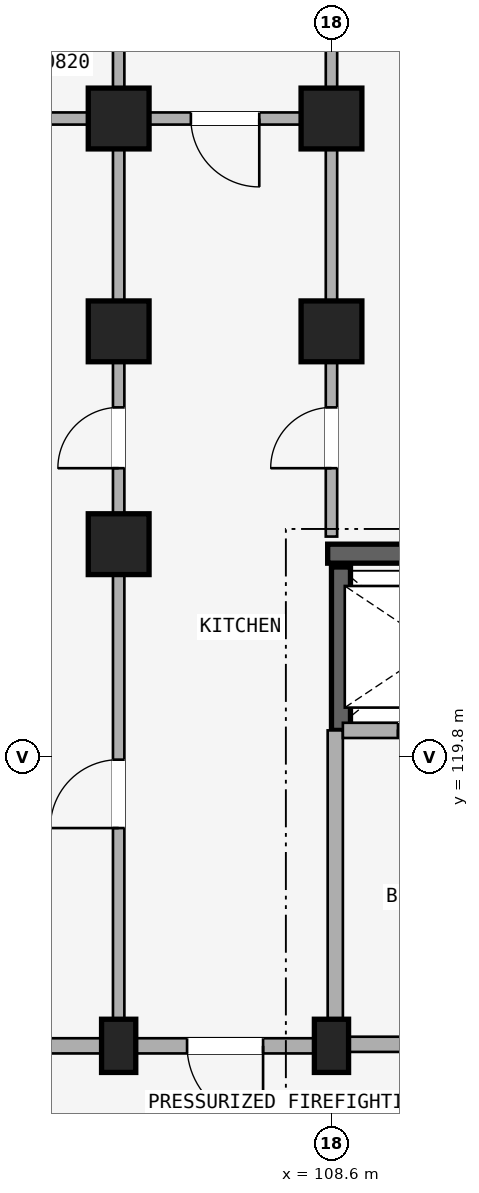
"""IFC4 building model, lengths in metres.
Left out: names, types, materials, properties, quantities, classifications, styles, units other than length and angle.
Written with IfcOpenShell. Run it as: python <this file> out.ifc"""

import sys

from ifc_helpers import new_model, si_unit, direction, frame, frame_2d, origin, origin_2d, place, context, subcontext, project, spatial, rectangle, extrude, element, fill, save


model = new_model("IFC4")
c1 = context("Model", 3, precision=1e-05, world=origin(), true_north=direction((0.0, 1.0)))
c2 = subcontext(c1, "Body", "Model", "MODEL_VIEW")
j1 = project(units=[si_unit("LENGTHUNIT", "METRE"), si_unit("PLANEANGLEUNIT", "RADIAN")], contexts=[c1])
p1 = place(None, origin())
s1 = spatial("IfcSite", under=j1, at=p1, CompositionType="ELEMENT")
p2 = place(p1, origin())
s2 = spatial("IfcBuilding", under=s1, at=p2, CompositionType="ELEMENT")
p3 = place(p2, frame((0.0, 0.0, 11.85)))
s3 = spatial("IfcBuildingStorey", under=s2, at=p3, CompositionType="ELEMENT", Elevation=11.85)
p4 = place(p3, frame((111.35, 122.475, 0.0), z_axis=(0.0, 0.0, 1.0), x_axis=(-1.0, 0.0, 0.0)))
e1 = element("IfcWall", 1, at=p4, inside=s3, PredefinedType="SHEAR", context=c2, shape_type="SweptSolid", body=[
    extrude(rectangle(XDim=2.8, YDim=0.25, at=frame_2d((1.4, 0.0))), origin(), (0.0, 0.0, 1.0), 2.93),
])
p5 = place(p3, frame((108.725, 120.15, 0.0), z_axis=(0.0, 0.0, 1.0), x_axis=(0.0, 1.0, 0.0)))
e2 = element("IfcWall", 2, at=p5, inside=s3, PredefinedType="SHEAR", context=c2, shape_type="SweptSolid", body=[
    extrude(rectangle(XDim=2.15, YDim=0.25, at=frame_2d((1.075, 0.0))), origin(), (0.0, 0.0, 1.0), 2.93),
])
p6 = place(p3, frame((108.6, 116.0, 0.0), z_axis=(0.0, 0.0, 1.0), x_axis=(1.0, 0.0, 0.0)))
e3 = element("IfcColumn", 3, at=p6, inside=s3, PredefinedType="COLUMN", context=c2, shape_type="SweptSolid", body=[
    extrude(rectangle(XDim=0.45, YDim=0.7, at=origin_2d()), origin(), (0.0, 0.0, 1.0), 2.93),
])
for number, where, z_axis, x_axis in (
    (4, (108.6, 125.4, 0.0), (0.0, 0.0, 1.0), (1.0, 0.0, 0.0)),
    (5, (108.6, 128.2, 0.0), (0.0, 0.0, 1.0), (1.0, 0.0, 0.0)),
):
    element("IfcColumn", number, at=place(p3, frame(where, z_axis=z_axis, x_axis=x_axis)), inside=s3, PredefinedType="COLUMN", context=c2, shape_type="SweptSolid", body=[
        extrude(rectangle(XDim=0.8, YDim=0.8, at=origin_2d()), origin(), (0.0, 0.0, 1.0), 2.93),
    ])
p7 = place(p3, frame((105.8, 116.0, 0.0), z_axis=(0.0, 0.0, 1.0), x_axis=(1.0, 0.0, 0.0)))
e6 = element("IfcColumn", 6, at=p7, inside=s3, PredefinedType="COLUMN", context=c2, shape_type="SweptSolid", body=[
    extrude(rectangle(XDim=0.45, YDim=0.7, at=origin_2d()), origin(), (0.0, 0.0, 1.0), 2.93),
])
for number, where, z_axis, x_axis in (
    (7, (105.8, 122.6, 0.0), (0.0, 0.0, 1.0), (1.0, 0.0, 0.0)),
    (8, (105.8, 125.4, 0.0), (0.0, 0.0, 1.0), (1.0, 0.0, 0.0)),
    (9, (105.8, 128.2, 0.0), (0.0, 0.0, 1.0), (1.0, 0.0, 0.0)),
):
    element("IfcColumn", number, at=place(p3, frame(where, z_axis=z_axis, x_axis=x_axis)), inside=s3, PredefinedType="COLUMN", context=c2, shape_type="SweptSolid", body=[
        extrude(rectangle(XDim=0.8, YDim=0.8, at=origin_2d()), origin(), (0.0, 0.0, 1.0), 2.93),
    ])
p8 = place(p3, frame((114.3, 116.02, 0.0), z_axis=(0.0, 0.0, 1.0), x_axis=(-1.0, 0.0, 0.0)))
e10 = element("IfcWall", 10, at=p8, inside=s3, PredefinedType="STANDARD", context=c2, shape_type="SweptSolid", body=[
    extrude(rectangle(XDim=5.65, YDim=0.2, at=frame_2d((2.825, 0.0))), origin(), (0.0, 0.0, 1.0), 2.372),
])
p9 = place(p8, frame((1.923, 0.0, 0.0)))
e11 = element("IfcOpeningElement", 11, at=p9, cuts=e10, PredefinedType="OPENING", context=c2, shape_type="SweptSolid", body=[
    extrude(rectangle(XDim=1.24, YDim=2.15, at=frame_2d((0.62, 1.075))), frame((0.0, 0.11, 0.0), z_axis=(0.0, -1.0, 0.0), x_axis=(1.0, 0.0, 0.0)), (0.0, 0.0, 1.0), 0.22),
])
p10 = place(p3, frame((108.65, 116.02, 0.0), z_axis=(0.0, 0.0, 1.0), x_axis=(0.0, 1.0, 0.0)))
e12 = element("IfcWall", 12, at=p10, inside=s3, PredefinedType="STANDARD", context=c2, shape_type="SweptSolid", body=[
    extrude(rectangle(XDim=4.13, YDim=0.2, at=frame_2d((2.065, 0.0))), origin(), (0.0, 0.0, 1.0), 2.372),
])
p11 = place(p3, frame((111.3, 120.15, 0.0), z_axis=(0.0, 0.0, 1.0), x_axis=(-1.0, 0.0, 0.0)))
e13 = element("IfcWall", 13, at=p11, inside=s3, PredefinedType="STANDARD", context=c2, shape_type="SweptSolid", body=[
    extrude(rectangle(XDim=2.55, YDim=0.2, at=frame_2d((1.275, 0.0))), origin(), (0.0, 0.0, 1.0), 2.372),
])
p12 = place(p11, frame((0.725, 0.0, 0.0)))
e14 = element("IfcOpeningElement", 14, at=p12, cuts=e13, PredefinedType="OPENING", context=c2, shape_type="SweptSolid", body=[
    extrude(rectangle(XDim=1.1, YDim=2.15, at=frame_2d((0.55, 1.075))), frame((0.0, 0.11, 0.0), z_axis=(0.0, -1.0, 0.0), x_axis=(1.0, 0.0, 0.0)), (0.0, 0.0, 1.0), 0.22),
])
p13 = place(p3, frame((108.6, 116.0, 0.0), z_axis=(0.0, 0.0, 1.0), x_axis=(-1.0, 0.0, 0.0)))
e15 = element("IfcWall", 15, at=p13, inside=s3, PredefinedType="STANDARD", context=c2, shape_type="SweptSolid", body=[
    extrude(rectangle(XDim=2.8, YDim=0.2, at=frame_2d((1.4, 0.0))), origin(), (0.0, 0.0, 1.0), 2.372),
])
p14 = place(p13, frame((0.9, 0.0, 0.0)))
e16 = element("IfcOpeningElement", 16, at=p14, cuts=e15, PredefinedType="OPENING", context=c2, shape_type="SweptSolid", body=[
    extrude(rectangle(XDim=1.0, YDim=2.15, at=frame_2d((0.5, 1.075))), frame((0.0, 0.11, 0.0), z_axis=(0.0, -1.0, 0.0), x_axis=(1.0, 0.0, 0.0)), (0.0, 0.0, 1.0), 0.22),
])
p15 = place(p3, frame((108.52, 128.2, 0.0), z_axis=(0.0, 0.0, 1.0), x_axis=(-1.0, 0.0, 0.0)))
e17 = element("IfcWall", 17, at=p15, inside=s3, PredefinedType="PLUMBINGWALL", context=c2, shape_type="SweptSolid", body=[
    extrude(rectangle(XDim=2.64, YDim=0.16, at=frame_2d((1.32, 0.0))), origin(), (0.0, 0.0, 1.0), 2.372),
])
p16 = place(p15, frame((0.87, 0.0, 0.0)))
e18 = element("IfcOpeningElement", 18, at=p16, cuts=e17, PredefinedType="OPENING", context=c2, shape_type="SweptSolid", body=[
    extrude(rectangle(XDim=0.9, YDim=2.1, at=frame_2d((0.45, 1.05))), frame((0.0, 0.09, 0.0), z_axis=(0.0, -1.0, 0.0), x_axis=(1.0, 0.0, 0.0)), (0.0, 0.0, 1.0), 0.18),
])
p17 = place(p3, frame((105.8, 116.0, 0.0), z_axis=(0.0, 0.0, 1.0), x_axis=(-1.0, 0.0, 0.0)))
e19 = element("IfcWall", 19, at=p17, inside=s3, PredefinedType="STANDARD", context=c2, shape_type="SweptSolid", body=[
    extrude(rectangle(XDim=2.8, YDim=0.2, at=frame_2d((1.4, 0.0))), origin(), (0.0, 0.0, 1.0), 2.372),
])
p18 = place(p3, frame((105.72, 128.2, 0.0), z_axis=(0.0, 0.0, 1.0), x_axis=(-1.0, 0.0, 0.0)))
e20 = element("IfcWall", 20, at=p18, inside=s3, PredefinedType="PLUMBINGWALL", context=c2, shape_type="SweptSolid", body=[
    extrude(rectangle(XDim=2.64, YDim=0.16, at=frame_2d((1.32, 0.0))), origin(), (0.0, 0.0, 1.0), 2.372),
])
p19 = place(p18, frame((0.92, 0.0, 0.0)))
e21 = element("IfcOpeningElement", 21, at=p19, cuts=e20, PredefinedType="OPENING", context=c2, shape_type="SweptSolid", body=[
    extrude(rectangle(XDim=0.8, YDim=2.1, at=frame_2d((0.4, 1.05))), frame((0.0, 0.09, 0.0), z_axis=(0.0, -1.0, 0.0), x_axis=(1.0, 0.0, 0.0)), (0.0, 0.0, 1.0), 0.18),
])
p20 = place(p3, frame((108.6, 122.7, 0.0), z_axis=(0.0, 0.0, 1.0), x_axis=(0.0, 1.0, 0.0)))
e22 = element("IfcWall", 22, at=p20, inside=s3, PredefinedType="PARTITIONING", context=c2, shape_type="SweptSolid", body=[
    extrude(rectangle(XDim=10.82, YDim=0.15, at=frame_2d((5.41, 0.0))), origin(), (0.0, 0.0, 1.0), 2.372),
])
p21 = place(p20, frame((0.899, 0.0, 0.0)))
e23 = element("IfcOpeningElement", 23, at=p21, cuts=e22, PredefinedType="OPENING", context=c2, shape_type="SweptSolid", body=[
    extrude(rectangle(XDim=0.8, YDim=2.1, at=frame_2d((0.4, 1.05))), frame((0.0, 0.085, 0.0), z_axis=(0.0, -1.0, 0.0), x_axis=(1.0, 0.0, 0.0)), (0.0, 0.0, 1.0), 0.17),
])
p22 = place(p3, frame((105.8, 116.05, 0.0), z_axis=(0.0, 0.0, 1.0), x_axis=(0.0, 1.0, 0.0)))
e24 = element("IfcWall", 24, at=p22, inside=s3, PredefinedType="PARTITIONING", context=c2, shape_type="SweptSolid", body=[
    extrude(rectangle(XDim=6.53, YDim=0.15, at=frame_2d((3.265, 0.0))), origin(), (0.0, 0.0, 1.0), 2.372),
])
p23 = place(p22, frame((2.815, 0.0, 0.0)))
e25 = element("IfcOpeningElement", 25, at=p23, cuts=e24, PredefinedType="OPENING", context=c2, shape_type="SweptSolid", body=[
    extrude(rectangle(XDim=0.9, YDim=2.1, at=frame_2d((0.45, 1.05))), frame((0.0, 0.085, 0.0), z_axis=(0.0, -1.0, 0.0), x_axis=(1.0, 0.0, 0.0)), (0.0, 0.0, 1.0), 0.17),
])
p24 = place(p3, frame((105.8, 122.7, 0.0), z_axis=(0.0, 0.0, 1.0), x_axis=(0.0, 1.0, 0.0)))
e26 = element("IfcWall", 26, at=p24, inside=s3, PredefinedType="PARTITIONING", context=c2, shape_type="SweptSolid", body=[
    extrude(rectangle(XDim=10.82, YDim=0.15, at=frame_2d((5.41, 0.0))), origin(), (0.0, 0.0, 1.0), 2.372),
])
p25 = place(p24, frame((0.899, 0.0, 0.0)))
e27 = element("IfcOpeningElement", 27, at=p25, cuts=e26, PredefinedType="OPENING", context=c2, shape_type="SweptSolid", body=[
    extrude(rectangle(XDim=0.8, YDim=2.1, at=frame_2d((0.4, 1.05))), frame((0.0, 0.085, 0.0), z_axis=(0.0, -1.0, 0.0), x_axis=(1.0, 0.0, 0.0)), (0.0, 0.0, 1.0), 0.17),
])
p26 = place(p12, origin())
e28 = element("IfcDoor", 28, at=p26, inside=s3, OperationType="SLIDING_TO_LEFT", PredefinedType="DOOR", context=c2, shape_type="SweptSolid", body=[
    extrude(rectangle(XDim=1.1, YDim=2.15, at=frame_2d((0.55, 1.075))), frame((0.0, 0.025, 0.0), z_axis=(0.0, -1.0, 0.0), x_axis=(1.0, 0.0, 0.0)), (0.0, 0.0, 1.0), 0.05),
])
fill(e14, e28)
p27 = place(p16, origin())
e29 = element("IfcDoor", 29, at=p27, inside=s3, OperationType="SINGLE_SWING_LEFT", PredefinedType="DOOR", context=c2, shape_type="SweptSolid", body=[
    extrude(rectangle(XDim=0.9, YDim=2.1, at=frame_2d((0.45, 1.05))), frame((0.0, 0.025, 0.0), z_axis=(0.0, -1.0, 0.0), x_axis=(1.0, 0.0, 0.0)), (0.0, 0.0, 1.0), 0.05),
])
fill(e18, e29)
p28 = place(p14, frame((1.0, 0.0, 0.0), z_axis=(0.0, 0.0, 1.0), x_axis=(-1.0, 0.0, 0.0)))
e30 = element("IfcDoor", 30, at=p28, inside=s3, OperationType="SINGLE_SWING_RIGHT", PredefinedType="DOOR", context=c2, shape_type="SweptSolid", body=[
    extrude(rectangle(XDim=1.0, YDim=2.15, at=frame_2d((0.5, 1.075))), frame((0.0, 0.025, 0.0), z_axis=(0.0, -1.0, 0.0), x_axis=(1.0, 0.0, 0.0)), (0.0, 0.0, 1.0), 0.05),
])
fill(e16, e30)
p29 = place(p21, frame((0.8, 0.0, 0.0), z_axis=(0.0, 0.0, 1.0), x_axis=(-1.0, 0.0, 0.0)))
e31 = element("IfcDoor", 31, at=p29, inside=s3, OperationType="SINGLE_SWING_RIGHT", PredefinedType="DOOR", context=c2, shape_type="SweptSolid", body=[
    extrude(rectangle(XDim=0.8, YDim=2.1, at=frame_2d((0.4, 1.05))), frame((0.0, 0.025, 0.0), z_axis=(0.0, -1.0, 0.0), x_axis=(1.0, 0.0, 0.0)), (0.0, 0.0, 1.0), 0.05),
])
fill(e23, e31)
p30 = place(p23, frame((0.9, 0.0, 0.0), z_axis=(0.0, 0.0, 1.0), x_axis=(-1.0, 0.0, 0.0)))
e32 = element("IfcDoor", 32, at=p30, inside=s3, OperationType="SINGLE_SWING_RIGHT", PredefinedType="DOOR", context=c2, shape_type="SweptSolid", body=[
    extrude(rectangle(XDim=0.9, YDim=2.1, at=frame_2d((0.45, 1.05))), frame((0.0, 0.025, 0.0), z_axis=(0.0, -1.0, 0.0), x_axis=(1.0, 0.0, 0.0)), (0.0, 0.0, 1.0), 0.05),
])
fill(e25, e32)
p31 = place(p25, origin())
e33 = element("IfcDoor", 33, at=p31, inside=s3, OperationType="SINGLE_SWING_LEFT", PredefinedType="DOOR", context=c2, shape_type="SweptSolid", body=[
    extrude(rectangle(XDim=0.8, YDim=2.1, at=frame_2d((0.4, 1.05))), frame((0.0, 0.025, 0.0), z_axis=(0.0, -1.0, 0.0), x_axis=(1.0, 0.0, 0.0)), (0.0, 0.0, 1.0), 0.05),
])
fill(e27, e33)
save(model, sys.argv[1])
